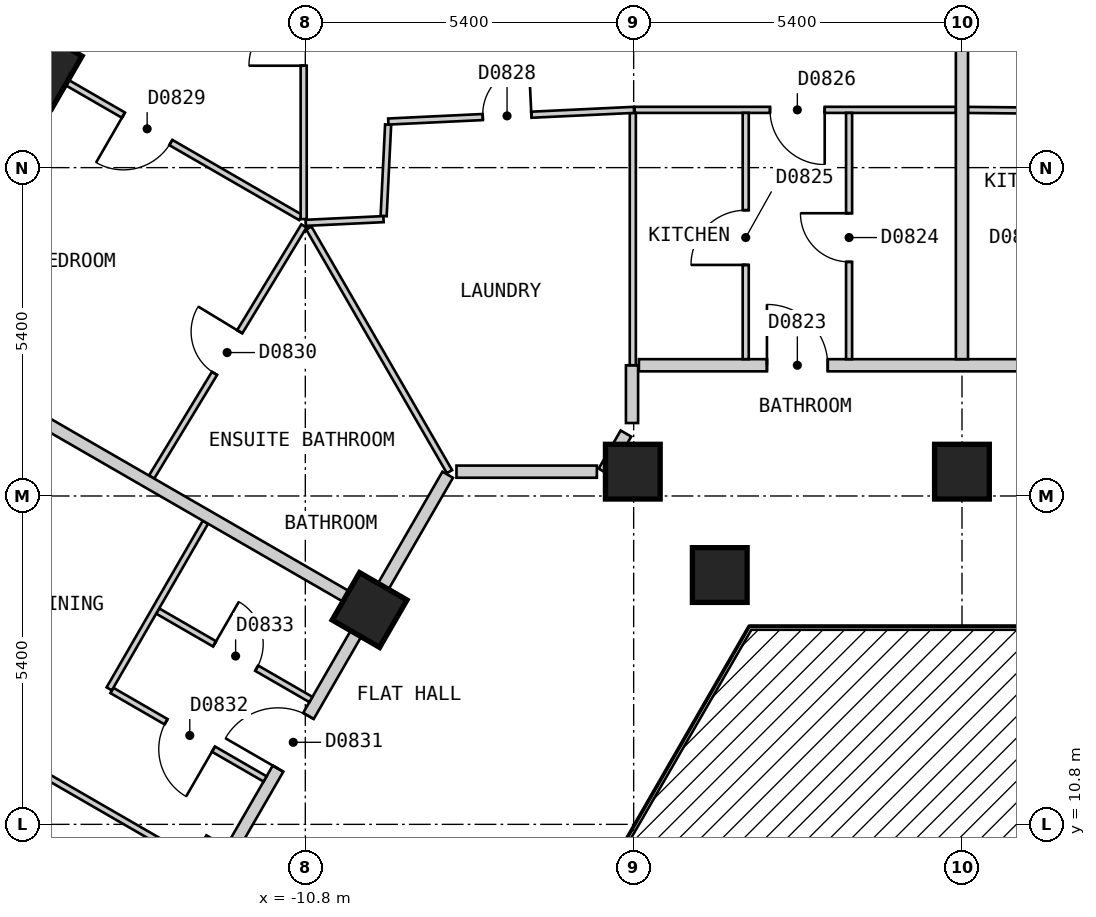
"""IFC4 building model, lengths in metres.
Left out: names, types, materials, properties, quantities, classifications, styles, units other than length and angle.
Written with IfcOpenShell. Run it as: python <this file> out.ifc"""

import sys

from ifc_helpers import new_model, si_unit, direction, frame, frame_2d, origin, origin_2d, place, context, subcontext, project, spatial, rectangle, extrude, element, fill, save


model = new_model("IFC4")
c1 = context("Model", 3, precision=1e-05, world=origin(), true_north=direction((0.0, 1.0)))
c2 = subcontext(c1, "Body", "Model", "MODEL_VIEW")
j1 = project(units=[si_unit("LENGTHUNIT", "METRE"), si_unit("PLANEANGLEUNIT", "RADIAN")], contexts=[c1])
p1 = place(None, origin())
s1 = spatial("IfcSite", under=j1, at=p1, CompositionType="ELEMENT")
p2 = place(p1, origin())
s2 = spatial("IfcBuilding", under=s1, at=p2, CompositionType="ELEMENT")
p3 = place(p2, frame((0.0, 0.0, 72.0)))
s3 = spatial("IfcBuildingStorey", under=s2, at=p3, CompositionType="ELEMENT", Elevation=72.0)
p4 = place(p3, frame((-15.155, 23.251, 0.0), z_axis=(0.0, 0.0, 1.0), x_axis=(-0.5, -0.866025403784, 0.0)))
e1 = element("IfcColumn", 1, at=p4, inside=s3, PredefinedType="COLUMN", context=c2, shape_type="SweptSolid", body=[
    extrude(rectangle(XDim=1.0, YDim=1.0, at=origin_2d()), origin(), (0.0, 0.0, 1.0), 3.0),
])
for number, where, z_axis, x_axis in (
    (2, (-0.001, 16.6, 0.0), (0.0, 0.0, 1.0), (-1.0, 0.0, 0.0)),
    (3, (-3.984, 14.9, 0.0), (0.0, 0.0, 1.0), (1.0, 0.0, 0.0)),
    (4, (-5.414, 16.6, 0.0), (0.0, 0.0, 1.0), (-1.0, 0.0, 0.0)),
    (5, (-9.743, 14.325, 0.0), (0.0, 0.0, 1.0), (-0.5, -0.866, 0.0)),
):
    element("IfcColumn", number, at=place(p3, frame(where, z_axis=z_axis, x_axis=x_axis)), inside=s3, PredefinedType="COLUMN", context=c2, shape_type="SweptSolid", body=[
        extrude(rectangle(XDim=0.9, YDim=0.9, at=origin_2d()), origin(), (0.0, 0.0, 1.0), 3.0),
    ])
p5 = place(p3, frame((-8.314, 16.6, 0.0), z_axis=(0.0, 0.0, 1.0), x_axis=(1.0, 0.0, 0.0)))
e6 = element("IfcWall", 6, at=p5, inside=s3, PredefinedType="PARTITIONING", context=c2, shape_type="SweptSolid", body=[
    extrude(rectangle(XDim=2.309, YDim=0.2, at=frame_2d((1.155, 0.0))), origin(), (0.0, 0.0, 1.0), 2.7),
])
p6 = place(p3, frame((-5.314, 18.35, 0.0), z_axis=(0.0, 0.0, 1.0), x_axis=(1.0, 0.0, 0.0)))
e7 = element("IfcWall", 7, at=p6, inside=s3, PredefinedType="PARTITIONING", context=c2, shape_type="SweptSolid", body=[
    extrude(rectangle(XDim=6.821, YDim=0.2, at=frame_2d((3.411, 0.0))), origin(), (0.0, 0.0, 1.0), 2.7),
])
p7 = place(p6, frame((2.106, 0.0, 0.0)))
e8 = element("IfcOpeningElement", 8, at=p7, cuts=e7, PredefinedType="OPENING", context=c2, shape_type="SweptSolid", body=[
    extrude(rectangle(XDim=1.0, YDim=2.1, at=frame_2d((0.5, 1.05))), frame((0.0, 0.11, 0.0), z_axis=(0.0, -1.0, 0.0), x_axis=(1.0, 0.0, 0.0)), (0.0, 0.0, 1.0), 0.22),
])
p8 = place(p3, frame((-5.889, 16.6, 0.0), z_axis=(0.0, 0.0, 1.0), x_axis=(0.499839240638, 0.866118198353, 0.0)))
e9 = element("IfcWall", 9, at=p8, inside=s3, PredefinedType="PARTITIONING", context=c2, shape_type="SweptSolid", body=[
    extrude(rectangle(XDim=0.724, YDim=0.2, at=frame_2d((0.362, 0.0))), origin(), (0.0, 0.0, 1.0), 2.7),
])
p9 = place(p3, frame((-18.562, -0.951, 0.0), z_axis=(0.0, 0.0, 1.0), x_axis=(0.499992962407, 0.866029466902, 0.0)))
e10 = element("IfcWall", 10, at=p9, inside=s3, PredefinedType="PARTITIONING", context=c2, shape_type="SweptSolid", body=[
    extrude(rectangle(XDim=20.208, YDim=0.2, at=frame_2d((10.104, 0.0))), origin(), (0.0, 0.0, 1.0), 2.7),
])
p10 = place(p9, frame((14.627, 0.0, 0.0)))
e11 = element("IfcOpeningElement", 11, at=p10, cuts=e10, PredefinedType="OPENING", context=c2, shape_type="SweptSolid", body=[
    extrude(rectangle(XDim=1.0, YDim=2.1, at=frame_2d((0.5, 1.05))), frame((0.0, 0.11, 0.0), z_axis=(0.0, -1.0, 0.0), x_axis=(1.0, 0.0, 0.0)), (0.0, 0.0, 1.0), 0.22),
])
p11 = place(p9, frame((4.581, 0.0, 0.0)))
e12 = element("IfcOpeningElement", 12, at=p11, cuts=e10, PredefinedType="OPENING", context=c2, shape_type="SweptSolid", body=[
    extrude(rectangle(XDim=1.0, YDim=2.1, at=frame_2d((0.5, 1.05))), frame((0.0, 0.11, 0.0), z_axis=(0.0, -1.0, 0.0), x_axis=(1.0, 0.0, 0.0)), (0.0, 0.0, 1.0), 0.22),
])
p12 = place(p3, frame((-5.427, 17.4, 0.0), z_axis=(0.0, 0.0, 1.0), x_axis=(0.0, 1.0, 0.0)))
e13 = element("IfcWall", 13, at=p12, inside=s3, PredefinedType="PARTITIONING", context=c2, shape_type="SweptSolid", body=[
    extrude(rectangle(XDim=0.95, YDim=0.2, at=frame_2d((0.475, 0.0))), origin(), (0.0, 0.0, 1.0), 2.7),
])
p13 = place(p3, frame((0.099, 22.549, 0.0), z_axis=(0.0, 0.0, 1.0), x_axis=(0.99995279897, -0.009715957599, 0.0)))
e14 = element("IfcWall", 14, at=p13, inside=s3, PredefinedType="PARTITIONING", context=c2, shape_type="SweptSolid", body=[
    extrude(rectangle(XDim=2.161, YDim=0.1, at=frame_2d((1.081, 0.0))), origin(), (0.0, 0.0, 1.0), 2.7),
])
p14 = place(p3, frame((-10.742, 20.606, 0.0), z_axis=(0.0, 0.0, 1.0), x_axis=(0.50003312339, -0.866006279142, 0.0)))
e15 = element("IfcWall", 15, at=p14, inside=s3, PredefinedType="PARTITIONING", context=c2, shape_type="SweptSolid", body=[
    extrude(rectangle(XDim=4.626, YDim=0.1, at=frame_2d((2.313, 0.0))), origin(), (0.0, 0.0, 1.0), 2.7),
])
p15 = place(p3, frame((-13.981, 13.002, 0.0), z_axis=(0.0, 0.0, 1.0), x_axis=(0.86595634977, -0.500119585993, 0.0)))
e16 = element("IfcWall", 16, at=p15, inside=s3, PredefinedType="PARTITIONING", context=c2, shape_type="SweptSolid", body=[
    extrude(rectangle(XDim=2.909, YDim=0.1, at=frame_2d((1.455, 0.0))), origin(), (0.0, 0.0, 1.0), 2.7),
])
p16 = place(p15, frame((1.029, 0.0, 0.0)))
e17 = element("IfcOpeningElement", 17, at=p16, cuts=e16, PredefinedType="OPENING", context=c2, shape_type="SweptSolid", body=[
    extrude(rectangle(XDim=0.9, YDim=2.1, at=frame_2d((0.45, 1.05))), frame((0.0, 0.06, 0.0), z_axis=(0.0, -1.0, 0.0), x_axis=(1.0, 0.0, 0.0)), (0.0, 0.0, 1.0), 0.12),
])
p17 = place(p3, frame((-13.228, 14.308, 0.0), z_axis=(0.0, 0.0, 1.0), x_axis=(0.866003949776, -0.500037157592, 0.0)))
e18 = element("IfcWall", 18, at=p17, inside=s3, PredefinedType="PARTITIONING", context=c2, shape_type="SweptSolid", body=[
    extrude(rectangle(XDim=2.91, YDim=0.1, at=frame_2d((1.455, 0.0))), origin(), (0.0, 0.0, 1.0), 2.7),
])
p18 = place(p17, frame((1.08, 0.0, 0.0)))
e19 = element("IfcOpeningElement", 19, at=p18, cuts=e18, PredefinedType="OPENING", context=c2, shape_type="SweptSolid", body=[
    extrude(rectangle(XDim=0.8, YDim=2.1, at=frame_2d((0.4, 1.05))), frame((0.0, 0.06, 0.0), z_axis=(0.0, -1.0, 0.0), x_axis=(1.0, 0.0, 0.0)), (0.0, 0.0, 1.0), 0.12),
])
p19 = place(p3, frame((-15.977, 23.725, 0.0), z_axis=(0.0, 0.0, 1.0), x_axis=(0.866028213039, -0.499995134196, 0.0)))
e20 = element("IfcWall", 20, at=p19, inside=s3, PredefinedType="PARTITIONING", context=c2, shape_type="SweptSolid", body=[
    extrude(rectangle(XDim=5.89, YDim=0.1, at=frame_2d((2.945, 0.0))), origin(), (0.0, 0.0, 1.0), 2.7),
])
p20 = place(p19, frame((2.524, 0.0, 0.0)))
e21 = element("IfcOpeningElement", 21, at=p20, cuts=e20, PredefinedType="OPENING", context=c2, shape_type="SweptSolid", body=[
    extrude(rectangle(XDim=0.9, YDim=2.1, at=frame_2d((0.45, 1.05))), frame((0.0, 0.06, 0.0), z_axis=(0.0, -1.0, 0.0), x_axis=(1.0, 0.0, 0.0)), (0.0, 0.0, 1.0), 0.12),
])
p21 = place(p3, frame((-21.001, 15.025, 0.0), z_axis=(0.0, 0.0, 1.0), x_axis=(0.866016855193, -0.500014806302, 0.0)))
e22 = element("IfcWall", 22, at=p21, inside=s3, PredefinedType="PARTITIONING", context=c2, shape_type="SweptSolid", body=[
    extrude(rectangle(XDim=10.0, YDim=0.1, at=frame_2d((5.0, 0.0))), origin(), (0.0, 0.0, 1.0), 2.7),
])
p22 = place(p21, frame((4.325, 0.0, 0.0)))
e23 = element("IfcOpeningElement", 23, at=p22, cuts=e22, PredefinedType="OPENING", context=c2, shape_type="SweptSolid", body=[
    extrude(rectangle(XDim=0.9, YDim=2.1, at=frame_2d((0.45, 1.05))), frame((0.0, 0.06, 0.0), z_axis=(0.0, -1.0, 0.0), x_axis=(1.0, 0.0, 0.0)), (0.0, 0.0, 1.0), 0.12),
])
p23 = place(p3, frame((-5.384, 22.55, 0.0), z_axis=(0.0, 0.0, 1.0), x_axis=(1.0, 0.0, 0.0)))
e24 = element("IfcWall", 24, at=p23, inside=s3, PredefinedType="PARTITIONING", context=c2, shape_type="SweptSolid", body=[
    extrude(rectangle(XDim=5.283, YDim=0.1, at=frame_2d((2.642, 0.0))), origin(), (0.0, 0.0, 1.0), 2.7),
])
p24 = place(p23, frame((2.226, 0.0, 0.0)))
e25 = element("IfcOpeningElement", 25, at=p24, cuts=e24, PredefinedType="OPENING", context=c2, shape_type="SweptSolid", body=[
    extrude(rectangle(XDim=0.9, YDim=2.1, at=frame_2d((0.45, 1.05))), frame((0.0, 0.06, 0.0), z_axis=(0.0, -1.0, 0.0), x_axis=(1.0, 0.0, 0.0)), (0.0, 0.0, 1.0), 0.12),
])
p25 = place(p3, frame((-13.328, 16.511, 0.0), z_axis=(0.0, 0.0, 1.0), x_axis=(0.518570528669, 0.855034857065, 0.0)))
e26 = element("IfcWall", 26, at=p25, inside=s3, PredefinedType="PARTITIONING", context=c2, shape_type="SweptSolid", body=[
    extrude(rectangle(XDim=4.83, YDim=0.1, at=frame_2d((2.415, 0.0))), origin(), (0.0, 0.0, 1.0), 2.7),
])
p26 = place(p25, frame((1.995, 0.0, 0.0)))
e27 = element("IfcOpeningElement", 27, at=p26, cuts=e26, PredefinedType="OPENING", context=c2, shape_type="SweptSolid", body=[
    extrude(rectangle(XDim=0.8, YDim=2.1, at=frame_2d((0.4, 1.05))), frame((0.0, 0.06, 0.0), z_axis=(0.0, -1.0, 0.0), x_axis=(1.0, 0.0, 0.0)), (0.0, 0.0, 1.0), 0.12),
])
p27 = place(p3, frame((-14.025, 13.028, 0.0), z_axis=(0.0, 0.0, 1.0), x_axis=(0.499965154568, 0.866045520869, 0.0)))
e28 = element("IfcWall", 28, at=p27, inside=s3, PredefinedType="PARTITIONING", context=c2, shape_type="SweptSolid", body=[
    extrude(rectangle(XDim=3.164, YDim=0.1, at=frame_2d((1.582, 0.0))), origin(), (0.0, 0.0, 1.0), 2.7),
])
p28 = place(p3, frame((-9.512, 20.803, 0.0), z_axis=(0.0, 0.0, 1.0), x_axis=(0.049089165168, 0.998794400196, 0.0)))
e29 = element("IfcWall", 29, at=p28, inside=s3, PredefinedType="PARTITIONING", context=c2, shape_type="SweptSolid", body=[
    extrude(rectangle(XDim=1.507, YDim=0.1, at=frame_2d((0.753, 0.0))), origin(), (0.0, 0.0, 1.0), 2.7),
])
p29 = place(p3, frame((-3.557, 18.45, 0.0), z_axis=(0.0, 0.0, 1.0), x_axis=(0.0, 1.0, 0.0)))
e30 = element("IfcWall", 30, at=p29, inside=s3, PredefinedType="PARTITIONING", context=c2, shape_type="SweptSolid", body=[
    extrude(rectangle(XDim=4.05, YDim=0.1, at=frame_2d((2.025, 0.0))), origin(), (0.0, 0.0, 1.0), 2.7),
])
p30 = place(p29, frame((1.55, 0.0, 0.0)))
e31 = element("IfcOpeningElement", 31, at=p30, cuts=e30, PredefinedType="OPENING", context=c2, shape_type="SweptSolid", body=[
    extrude(rectangle(XDim=0.9, YDim=2.1, at=frame_2d((0.45, 1.05))), frame((0.0, 0.06, 0.0), z_axis=(0.0, -1.0, 0.0), x_axis=(1.0, 0.0, 0.0)), (0.0, 0.0, 1.0), 0.12),
])
p31 = place(p3, frame((-5.414, 18.35, 0.0), z_axis=(0.0, 0.0, 1.0), x_axis=(0.0, 1.0, 0.0)))
e32 = element("IfcWall", 32, at=p31, inside=s3, PredefinedType="PARTITIONING", context=c2, shape_type="SweptSolid", body=[
    extrude(rectangle(XDim=4.15, YDim=0.1, at=frame_2d((2.075, 0.0))), origin(), (0.0, 0.0, 1.0), 2.7),
])
p32 = place(p3, frame((-10.827, 20.753, 0.0), z_axis=(0.0, 0.0, 1.0), x_axis=(0.0, 1.0, 0.0)))
e33 = element("IfcWall", 33, at=p32, inside=s3, PredefinedType="PARTITIONING", context=c2, shape_type="SweptSolid", body=[
    extrude(rectangle(XDim=5.947, YDim=0.1, at=frame_2d((2.974, 0.0))), origin(), (0.0, 0.0, 1.0), 2.7),
])
p33 = place(p32, frame((2.523, 0.0, 0.0)))
e34 = element("IfcOpeningElement", 34, at=p33, cuts=e33, PredefinedType="OPENING", context=c2, shape_type="SweptSolid", body=[
    extrude(rectangle(XDim=0.9, YDim=2.1, at=frame_2d((0.45, 1.05))), frame((0.0, 0.06, 0.0), z_axis=(0.0, -1.0, 0.0), x_axis=(1.0, 0.0, 0.0)), (0.0, 0.0, 1.0), 0.12),
])
p34 = place(p3, frame((-1.857, 18.45, 0.0), z_axis=(0.0, 0.0, 1.0), x_axis=(0.0, 1.0, 0.0)))
e35 = element("IfcWall", 35, at=p34, inside=s3, PredefinedType="PARTITIONING", context=c2, shape_type="SweptSolid", body=[
    extrude(rectangle(XDim=4.05, YDim=0.1, at=frame_2d((2.025, 0.0))), origin(), (0.0, 0.0, 1.0), 2.7),
])
p35 = place(p34, frame((1.6, 0.0, 0.0)))
e36 = element("IfcOpeningElement", 36, at=p35, cuts=e35, PredefinedType="OPENING", context=c2, shape_type="SweptSolid", body=[
    extrude(rectangle(XDim=0.8, YDim=2.1, at=frame_2d((0.4, 1.05))), frame((0.0, 0.06, 0.0), z_axis=(0.0, -1.0, 0.0), x_axis=(1.0, 0.0, 0.0)), (0.0, 0.0, 1.0), 0.12),
])
p36 = place(p3, frame((-10.792, 20.692, 0.0), z_axis=(0.0, 0.0, 1.0), x_axis=(0.998861653202, 0.04770112957, 0.0)))
e37 = element("IfcWall", 37, at=p36, inside=s3, PredefinedType="PARTITIONING", context=c2, shape_type="SweptSolid", body=[
    extrude(rectangle(XDim=1.28, YDim=0.1, at=frame_2d((0.64, 0.0))), origin(), (0.0, 0.0, 1.0), 2.7),
])
p37 = place(p3, frame((-9.435, 22.358, 0.0), z_axis=(0.0, 0.0, 1.0), x_axis=(0.998871548472, 0.04749346959, 0.0)))
e38 = element("IfcWall", 38, at=p37, inside=s3, PredefinedType="PARTITIONING", context=c2, shape_type="SweptSolid", body=[
    extrude(rectangle(XDim=4.046, YDim=0.1, at=frame_2d((2.023, 0.0))), origin(), (0.0, 0.0, 1.0), 2.7),
])
p38 = place(p37, frame((1.555, 0.0, 0.0)))
e39 = element("IfcOpeningElement", 39, at=p38, cuts=e38, PredefinedType="OPENING", context=c2, shape_type="SweptSolid", body=[
    extrude(rectangle(XDim=0.8, YDim=2.1, at=frame_2d((0.4, 1.05))), frame((0.0, 0.06, 0.0), z_axis=(0.0, -1.0, 0.0), x_axis=(1.0, 0.0, 0.0)), (0.0, 0.0, 1.0), 0.12),
])
p39 = place(p3, frame((-23.513, 10.675, 0.0), z_axis=(0.0, 0.0, 1.0), x_axis=(0.866041268327, -0.499972520799, 0.0)))
e40 = element("IfcWall", 40, at=p39, inside=s3, PredefinedType="PARTITIONING", context=c2, shape_type="SweptSolid", body=[
    extrude(rectangle(XDim=10.0, YDim=0.2, at=frame_2d((5.0, 0.0))), origin(), (0.0, 0.0, 1.0), 2.7),
])
p40 = place(p3, frame((-18.489, 19.375, 0.0), z_axis=(0.0, 0.0, 1.0), x_axis=(0.866016855193, -0.500014806302, 0.0)))
e41 = element("IfcWall", 41, at=p40, inside=s3, PredefinedType="PARTITIONING", context=c2, shape_type="SweptSolid", body=[
    extrude(rectangle(XDim=10.0, YDim=0.2, at=frame_2d((5.0, 0.0))), origin(), (0.0, 0.0, 1.0), 2.7),
])
p41 = place(p3, frame((-0.001, 18.45, 0.0), z_axis=(0.0, 0.0, 1.0), x_axis=(0.0, 1.0, 0.0)))
e42 = element("IfcWall", 42, at=p41, inside=s3, PredefinedType="PARTITIONING", context=c2, shape_type="SweptSolid", body=[
    extrude(rectangle(XDim=8.25, YDim=0.2, at=frame_2d((4.125, 0.0))), origin(), (0.0, 0.0, 1.0), 2.7),
])
p42 = place(p7, origin())
e43 = element("IfcDoor", 43, at=p42, inside=s3, OperationType="SINGLE_SWING_LEFT", PredefinedType="DOOR", context=c2, shape_type="SweptSolid", body=[
    extrude(rectangle(XDim=1.0, YDim=2.1, at=frame_2d((0.5, 1.05))), frame((0.0, 0.025, 0.0), z_axis=(0.0, -1.0, 0.0), x_axis=(1.0, 0.0, 0.0)), (0.0, 0.0, 1.0), 0.05),
])
fill(e8, e43)
p43 = place(p35, origin())
e44 = element("IfcDoor", 44, at=p43, inside=s3, OperationType="SINGLE_SWING_RIGHT", PredefinedType="DOOR", context=c2, shape_type="SweptSolid", body=[
    extrude(rectangle(XDim=0.8, YDim=2.1, at=frame_2d((0.4, 1.05))), frame((0.0, 0.025, 0.0), z_axis=(0.0, -1.0, 0.0), x_axis=(1.0, 0.0, 0.0)), (0.0, 0.0, 1.0), 0.05),
])
fill(e36, e44)
p44 = place(p30, origin())
e45 = element("IfcDoor", 45, at=p44, inside=s3, OperationType="SINGLE_SWING_LEFT", PredefinedType="DOOR", context=c2, shape_type="SweptSolid", body=[
    extrude(rectangle(XDim=0.9, YDim=2.1, at=frame_2d((0.45, 1.05))), frame((0.0, 0.025, 0.0), z_axis=(0.0, -1.0, 0.0), x_axis=(1.0, 0.0, 0.0)), (0.0, 0.0, 1.0), 0.05),
])
fill(e31, e45)
p45 = place(p24, origin())
e46 = element("IfcDoor", 46, at=p45, inside=s3, OperationType="SINGLE_SWING_RIGHT", PredefinedType="DOOR", context=c2, shape_type="SweptSolid", body=[
    extrude(rectangle(XDim=0.9, YDim=2.1, at=frame_2d((0.45, 1.05))), frame((0.0, 0.025, 0.0), z_axis=(0.0, -1.0, 0.0), x_axis=(1.0, 0.0, 0.0)), (0.0, 0.0, 1.0), 0.05),
])
fill(e25, e46)
p46 = place(p33, origin())
e47 = element("IfcDoor", 47, at=p46, inside=s3, OperationType="SINGLE_SWING_LEFT", PredefinedType="DOOR", context=c2, shape_type="SweptSolid", body=[
    extrude(rectangle(XDim=0.9, YDim=2.1, at=frame_2d((0.45, 1.05))), frame((0.0, 0.025, 0.0), z_axis=(0.0, -1.0, 0.0), x_axis=(1.0, 0.0, 0.0)), (0.0, 0.0, 1.0), 0.05),
])
fill(e34, e47)
p47 = place(p38, origin())
e48 = element("IfcDoor", 48, at=p47, inside=s3, OperationType="SINGLE_SWING_RIGHT", PredefinedType="DOOR", context=c2, shape_type="SweptSolid", body=[
    extrude(rectangle(XDim=0.8, YDim=2.1, at=frame_2d((0.4, 1.05))), frame((0.0, 0.025, 0.0), z_axis=(0.0, -1.0, 0.0), x_axis=(1.0, 0.0, 0.0)), (0.0, 0.0, 1.0), 0.05),
])
fill(e39, e48)
p48 = place(p20, origin())
e49 = element("IfcDoor", 49, at=p48, inside=s3, OperationType="SINGLE_SWING_LEFT", PredefinedType="DOOR", context=c2, shape_type="SweptSolid", body=[
    extrude(rectangle(XDim=0.9, YDim=2.1, at=frame_2d((0.45, 1.05))), frame((0.0, 0.025, 0.0), z_axis=(0.0, -1.0, 0.0), x_axis=(1.0, 0.0, 0.0)), (0.0, 0.0, 1.0), 0.05),
])
fill(e21, e49)
p49 = place(p26, origin())
e50 = element("IfcDoor", 50, at=p49, inside=s3, OperationType="SINGLE_SWING_RIGHT", PredefinedType="DOOR", context=c2, shape_type="SweptSolid", body=[
    extrude(rectangle(XDim=0.8, YDim=2.1, at=frame_2d((0.4, 1.05))), frame((0.0, 0.025, 0.0), z_axis=(0.0, -1.0, 0.0), x_axis=(1.0, 0.0, 0.0)), (0.0, 0.0, 1.0), 0.05),
])
fill(e27, e50)
p50 = place(p10, origin())
e51 = element("IfcDoor", 51, at=p50, inside=s3, OperationType="SINGLE_SWING_LEFT", PredefinedType="DOOR", context=c2, shape_type="SweptSolid", body=[
    extrude(rectangle(XDim=1.0, YDim=2.1, at=frame_2d((0.5, 1.05))), frame((0.0, 0.025, 0.0), z_axis=(0.0, -1.0, 0.0), x_axis=(1.0, 0.0, 0.0)), (0.0, 0.0, 1.0), 0.05),
])
fill(e11, e51)
p51 = place(p16, origin())
e52 = element("IfcDoor", 52, at=p51, inside=s3, OperationType="SINGLE_SWING_RIGHT", PredefinedType="DOOR", context=c2, shape_type="SweptSolid", body=[
    extrude(rectangle(XDim=0.9, YDim=2.1, at=frame_2d((0.45, 1.05))), frame((0.0, 0.025, 0.0), z_axis=(0.0, -1.0, 0.0), x_axis=(1.0, 0.0, 0.0)), (0.0, 0.0, 1.0), 0.05),
])
fill(e17, e52)
p52 = place(p18, origin())
e53 = element("IfcDoor", 53, at=p52, inside=s3, OperationType="SINGLE_SWING_LEFT", PredefinedType="DOOR", context=c2, shape_type="SweptSolid", body=[
    extrude(rectangle(XDim=0.8, YDim=2.1, at=frame_2d((0.4, 1.05))), frame((0.0, 0.025, 0.0), z_axis=(0.0, -1.0, 0.0), x_axis=(1.0, 0.0, 0.0)), (0.0, 0.0, 1.0), 0.05),
])
fill(e19, e53)
save(model, sys.argv[1])
